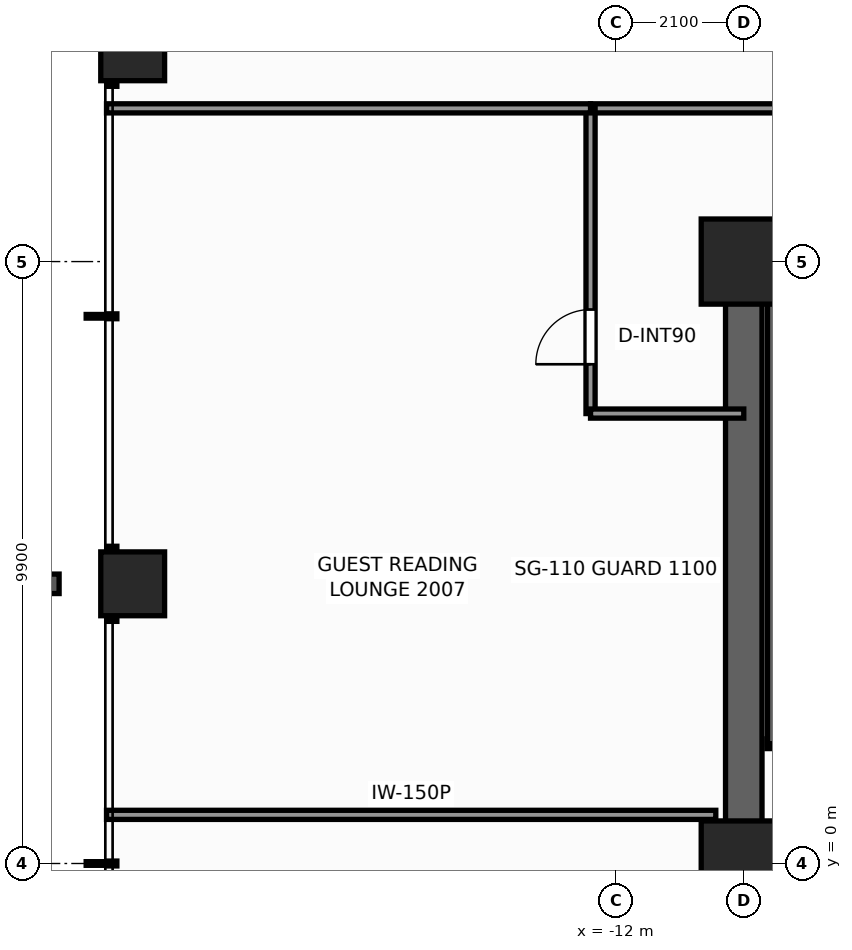
"""IFC4 building model, lengths in metres.
Left out: names, types, materials, properties, quantities, classifications, styles, units other than length and angle.
Written with IfcOpenShell. Run it as: python <this file> out.ifc"""

import sys

from ifc_helpers import new_model, si_unit, direction, frame, frame_2d, origin, origin_2d, place, context, subcontext, project, spatial, rectangle, extrude, element, fill, save


model = new_model("IFC4")
c1 = context("Model", 3, precision=1e-05, world=origin(), true_north=direction((0.0, 1.0)))
c2 = subcontext(c1, "Body", "Model", "MODEL_VIEW")
j1 = project(units=[si_unit("LENGTHUNIT", "METRE"), si_unit("PLANEANGLEUNIT", "RADIAN")], contexts=[c1])
p1 = place(None, origin())
s1 = spatial("IfcSite", under=j1, at=p1, CompositionType="ELEMENT")
p2 = place(p1, origin())
s2 = spatial("IfcBuilding", under=s1, at=p2, CompositionType="ELEMENT")
p3 = place(p2, frame((0.0, 0.0, 72.2)))
s3 = spatial("IfcBuildingStorey", under=s2, at=p3, CompositionType="ELEMENT", Elevation=72.2)
p4 = place(p3, frame((-10.2, 9.9, 0.0), z_axis=(0.0, 0.0, 1.0), x_axis=(1.0, 0.0, 0.0)))
e1 = element("IfcWall", 1, at=p4, inside=s3, PredefinedType="SHEAR", context=c2, shape_type="SweptSolid", body=[
    extrude(rectangle(XDim=14.62, YDim=0.6, at=frame_2d((7.31, 0.0))), origin(), (0.0, 0.0, 1.0), 3.3),
])
p5 = place(p3, frame((-9.9, -3.7, 0.0), z_axis=(0.0, 0.0, 1.0), x_axis=(0.0, 1.0, 0.0)))
e2 = element("IfcWall", 2, at=p5, inside=s3, PredefinedType="SHEAR", context=c2, shape_type="SweptSolid", body=[
    extrude(rectangle(XDim=13.3, YDim=0.6, at=frame_2d((6.65, 0.0))), origin(), (0.0, 0.0, 1.0), 3.3),
])
p6 = place(p5, frame((0.35, 0.0, 0.0)))
e3 = element("IfcOpeningElement", 3, at=p6, cuts=e2, PredefinedType="OPENING", context=c2, shape_type="SweptSolid", body=[
    extrude(rectangle(XDim=1.1, YDim=2.2, at=frame_2d((0.55, 1.1))), frame((0.0, 0.31, 0.0), z_axis=(0.0, -1.0, 0.0), x_axis=(1.0, 0.0, 0.0)), (0.0, 0.0, 1.0), 0.62),
])
for number, where, z_axis, x_axis in (
    (4, (-9.9, 9.9, 0.0), (0.0, 0.0, 1.0), (1.0, 0.0, 0.0)),
    (5, (-9.9, 0.0, 0.0), (0.0, 0.0, 1.0), (1.0, 0.0, 0.0)),
):
    element("IfcColumn", number, at=place(p3, frame(where, z_axis=z_axis, x_axis=x_axis)), inside=s3, PredefinedType="COLUMN", context=c2, shape_type="SweptSolid", body=[
        extrude(rectangle(XDim=1.4, YDim=1.4, at=origin_2d()), origin(), (0.0, 0.0, 1.0), 3.3),
    ])
for number, where, z_axis, x_axis in (
    (6, (-19.95, 4.6, 0.0), (0.0, 0.0, 1.0), (1.0, 0.0, 0.0)),
    (7, (-19.95, 13.4, 0.0), (0.0, 0.0, 1.0), (1.0, 0.0, 0.0)),
):
    element("IfcColumn", number, at=place(p3, frame(where, z_axis=z_axis, x_axis=x_axis)), inside=s3, PredefinedType="COLUMN", context=c2, shape_type="SweptSolid", body=[
        extrude(rectangle(XDim=1.05, YDim=1.05, at=origin_2d()), origin(), (0.0, 0.0, 1.0), 3.3),
    ])
p7 = place(p3, frame((-9.52, 1.97, 0.0), z_axis=(0.0, 0.0, 1.0), x_axis=(1.0, 0.0, 0.0)))
e8 = element("IfcWall", 8, at=p7, inside=s3, PredefinedType="SHEAR", context=c2, shape_type="SweptSolid", body=[
    extrude(rectangle(XDim=3.52, YDim=0.16, at=frame_2d((1.76, 0.0))), origin(), (0.0, 0.0, 1.0), 3.3),
])
p8 = place(p7, frame((1.15, 0.0, 0.0)))
e9 = element("IfcOpeningElement", 9, at=p8, cuts=e8, PredefinedType="OPENING", context=c2, shape_type="SweptSolid", body=[
    extrude(rectangle(XDim=1.1, YDim=2.2, at=frame_2d((0.55, 1.1))), frame((0.0, 0.09, 0.0), z_axis=(0.0, -1.0, 0.0), x_axis=(1.0, 0.0, 0.0)), (0.0, 0.0, 1.0), 0.18),
])
p9 = place(p3, frame((-9.52, 9.53, 0.0), z_axis=(0.0, 0.0, 1.0), x_axis=(1.0, 0.0, 0.0)))
e10 = element("IfcWall", 10, at=p9, inside=s3, PredefinedType="SHEAR", context=c2, shape_type="SweptSolid", body=[
    extrude(rectangle(XDim=3.52, YDim=0.16, at=frame_2d((1.76, 0.0))), origin(), (0.0, 0.0, 1.0), 3.3),
])
p10 = place(p3, frame((-9.43, 1.97, 0.0), z_axis=(0.0, 0.0, 1.0), x_axis=(0.0, 1.0, 0.0)))
e11 = element("IfcWall", 11, at=p10, inside=s3, PredefinedType="SHEAR", context=c2, shape_type="SweptSolid", body=[
    extrude(rectangle(XDim=7.56, YDim=0.16, at=frame_2d((3.78, 0.0))), origin(), (0.0, 0.0, 1.0), 3.3),
])
p11 = place(p3, frame((-12.42, 12.42, 0.0), z_axis=(0.0, 0.0, 1.0), x_axis=(1.0, 0.0, 0.0)))
e12 = element("IfcWall", 12, at=p11, inside=s3, PredefinedType="PARTITIONING", context=c2, shape_type="SweptSolid", body=[
    extrude(rectangle(XDim=25.0, YDim=0.15, at=frame_2d((12.5, 0.0))), origin(), (0.0, 0.0, 1.0), 2.292),
])
p12 = place(p11, frame((4.435, 0.0, 0.0)))
e13 = element("IfcOpeningElement", 13, at=p12, cuts=e12, PredefinedType="OPENING", context=c2, shape_type="SweptSolid", body=[
    extrude(rectangle(XDim=0.9, YDim=2.06, at=frame_2d((0.45, 1.03))), frame((0.0, 0.085, 0.0), z_axis=(0.0, -1.0, 0.0), x_axis=(1.0, 0.0, 0.0)), (0.0, 0.0, 1.0), 0.17),
])
p13 = place(p11, frame((19.505, 0.0, 0.0)))
e14 = element("IfcOpeningElement", 14, at=p13, cuts=e12, PredefinedType="OPENING", context=c2, shape_type="SweptSolid", body=[
    extrude(rectangle(XDim=0.9, YDim=2.06, at=frame_2d((0.45, 1.03))), frame((0.0, 0.085, 0.0), z_axis=(0.0, -1.0, 0.0), x_axis=(1.0, 0.0, 0.0)), (0.0, 0.0, 1.0), 0.17),
])
p14 = place(p3, frame((-12.42, 7.4, 0.0), z_axis=(0.0, 0.0, 1.0), x_axis=(0.0, 1.0, 0.0)))
e15 = element("IfcWall", 15, at=p14, inside=s3, PredefinedType="PARTITIONING", context=c2, shape_type="SweptSolid", body=[
    extrude(rectangle(XDim=5.02, YDim=0.15, at=frame_2d((2.51, 0.0))), origin(), (0.0, 0.0, 1.0), 2.292),
])
p15 = place(p14, frame((0.811, 0.0, 0.0)))
e16 = element("IfcOpeningElement", 16, at=p15, cuts=e15, PredefinedType="OPENING", context=c2, shape_type="SweptSolid", body=[
    extrude(rectangle(XDim=0.9, YDim=2.06, at=frame_2d((0.45, 1.03))), frame((0.0, 0.085, 0.0), z_axis=(0.0, -1.0, 0.0), x_axis=(1.0, 0.0, 0.0)), (0.0, 0.0, 1.0), 0.17),
])
p16 = place(p3, frame((-12.42, 7.4, 0.0), z_axis=(0.0, 0.0, 1.0), x_axis=(1.0, 0.0, 0.0)))
e17 = element("IfcWall", 17, at=p16, inside=s3, PredefinedType="PARTITIONING", context=c2, shape_type="SweptSolid", body=[
    extrude(rectangle(XDim=2.52, YDim=0.15, at=frame_2d((1.26, 0.0))), origin(), (0.0, 0.0, 1.0), 3.08),
])
p17 = place(p3, frame((-20.38, 12.42, 0.0), z_axis=(0.0, 0.0, 1.0), x_axis=(1.0, 0.0, 0.0)))
e18 = element("IfcWall", 18, at=p17, inside=s3, PredefinedType="PARTITIONING", context=c2, shape_type="SweptSolid", body=[
    extrude(rectangle(XDim=7.96, YDim=0.15, at=frame_2d((3.98, 0.0))), origin(), (0.0, 0.0, 1.0), 2.292),
])
p18 = place(p3, frame((-20.38, 0.8, 0.0), z_axis=(0.0, 0.0, 1.0), x_axis=(1.0, 0.0, 0.0)))
e19 = element("IfcWall", 19, at=p18, inside=s3, PredefinedType="PARTITIONING", context=c2, shape_type="SweptSolid", body=[
    extrude(rectangle(XDim=10.02, YDim=0.15, at=frame_2d((5.01, 0.0))), origin(), (0.0, 0.0, 1.0), 2.449),
])
p19 = place(p15, origin())
e20 = element("IfcDoor", 20, at=p19, inside=s3, OperationType="SINGLE_SWING_LEFT", PredefinedType="DOOR", context=c2, shape_type="SweptSolid", body=[
    extrude(rectangle(XDim=0.9, YDim=2.06, at=frame_2d((0.45, 1.03))), frame((0.0, 0.025, 0.0), z_axis=(0.0, -1.0, 0.0), x_axis=(1.0, 0.0, 0.0)), (0.0, 0.0, 1.0), 0.05),
])
fill(e16, e20)
save(model, sys.argv[1])
